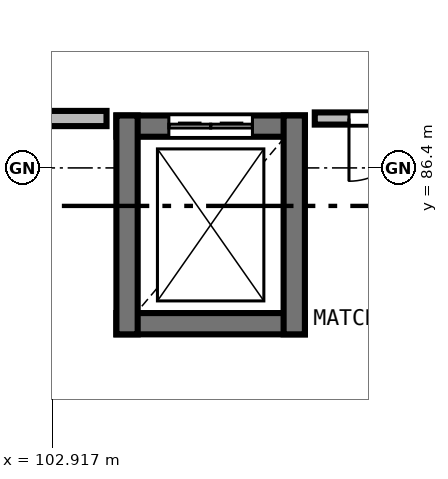
"""IFC4 building model, lengths in metres.
Left out: names, types, materials, properties, quantities, classifications, styles, units other than length and angle.
Written with IfcOpenShell. Run it as: python <this file> out.ifc"""

import sys

from ifc_helpers import new_model, si_unit, direction, frame, frame_2d, origin, place, context, subcontext, project, spatial, rectangle, extrude, element, fill, save


model = new_model("IFC4")
c1 = context("Model", 3, precision=1e-05, world=origin(), true_north=direction((0.0, 1.0)))
c2 = subcontext(c1, "Body", "Model", "MODEL_VIEW")
j1 = project(units=[si_unit("LENGTHUNIT", "METRE"), si_unit("PLANEANGLEUNIT", "RADIAN")], contexts=[c1])
p1 = place(None, origin())
s1 = spatial("IfcSite", under=j1, at=p1, CompositionType="ELEMENT")
p2 = place(p1, origin())
s2 = spatial("IfcBuilding", under=s1, at=p2, CompositionType="ELEMENT")
p3 = place(p2, frame((0.0, 0.0, 13.5)))
s3 = spatial("IfcBuildingStorey", under=s2, at=p3, CompositionType="ELEMENT", Elevation=13.5)
p4 = place(p3, frame((106.24, 84.35, 0.0), z_axis=(0.0, 0.0, 1.0), x_axis=(-1.0, 0.0, 0.0)))
e1 = element("IfcWall", 1, at=p4, inside=s3, PredefinedType="SHEAR", context=c2, shape_type="SweptSolid", body=[
    extrude(rectangle(XDim=2.48, YDim=0.28, at=frame_2d((1.24, 0.0))), origin(), (0.0, 0.0, 1.0), 3.94),
])
p5 = place(p3, frame((103.76, 86.95, 0.0), z_axis=(0.0, 0.0, 1.0), x_axis=(1.0, 0.0, 0.0)))
e2 = element("IfcWall", 2, at=p5, inside=s3, PredefinedType="SHEAR", context=c2, shape_type="SweptSolid", body=[
    extrude(rectangle(XDim=2.48, YDim=0.28, at=frame_2d((1.24, 0.0))), origin(), (0.0, 0.0, 1.0), 3.94),
])
p6 = place(p5, frame((0.69, 0.0, 0.0)))
e3 = element("IfcOpeningElement", 3, at=p6, cuts=e2, PredefinedType="OPENING", context=c2, shape_type="SweptSolid", body=[
    extrude(rectangle(XDim=1.1, YDim=2.15, at=frame_2d((0.55, 1.075))), frame((0.0, 0.15, 0.0), z_axis=(0.0, -1.0, 0.0), x_axis=(1.0, 0.0, 0.0)), (0.0, 0.0, 1.0), 0.3),
])
for number, where, z_axis, x_axis in (
    (4, (103.9, 84.21, 0.0), (0.0, 0.0, 1.0), (0.0, 1.0, 0.0)),
    (5, (106.1, 87.09, 0.0), (0.0, 0.0, 1.0), (0.0, -1.0, 0.0)),
):
    element("IfcWall", number, at=place(p3, frame(where, z_axis=z_axis, x_axis=x_axis)), inside=s3, PredefinedType="SHEAR", context=c2, shape_type="SweptSolid", body=[
        extrude(rectangle(XDim=2.88, YDim=0.28, at=frame_2d((1.44, 0.0))), origin(), (0.0, 0.0, 1.0), 3.94),
    ])
p7 = place(p3, frame((134.18, 87.05, 0.0), z_axis=(0.0, 0.0, 1.0), x_axis=(-1.0, 0.0, 0.0)))
e6 = element("IfcWall", 6, at=p7, inside=s3, PredefinedType="PARTITIONING", context=c2, shape_type="SweptSolid", body=[
    extrude(rectangle(XDim=27.81, YDim=0.16, at=frame_2d((13.905, 0.0))), origin(), (0.0, 0.0, 1.0), 3.355),
])
p8 = place(p7, frame((25.71, 0.0, 0.0)))
e7 = element("IfcOpeningElement", 7, at=p8, cuts=e6, PredefinedType="OPENING", context=c2, shape_type="SweptSolid", body=[
    extrude(rectangle(XDim=1.65, YDim=2.2, at=frame_2d((0.825, 1.1))), frame((0.0, 0.09, 0.0), z_axis=(0.0, -1.0, 0.0), x_axis=(1.0, 0.0, 0.0)), (0.0, 0.0, 1.0), 0.18),
])
p9 = place(p3, frame((103.63, 87.05, 0.0), z_axis=(0.0, 0.0, 1.0), x_axis=(-1.0, 0.0, 0.0)))
e8 = element("IfcWall", 8, at=p9, inside=s3, PredefinedType="SOLIDWALL", context=c2, shape_type="SweptSolid", body=[
    extrude(rectangle(XDim=2.83, YDim=0.2, at=frame_2d((1.415, 0.0))), origin(), (0.0, 0.0, 1.0), 3.355),
])
p10 = place(p6, origin())
e9 = element("IfcDoor", 9, at=p10, inside=s3, OperationType="DOUBLE_DOOR_SLIDING", PredefinedType="DOOR", context=c2, shape_type="SweptSolid", body=[
    extrude(rectangle(XDim=1.1, YDim=2.15, at=frame_2d((0.55, 1.075))), frame((0.0, 0.025, 0.0), z_axis=(0.0, -1.0, 0.0), x_axis=(1.0, 0.0, 0.0)), (0.0, 0.0, 1.0), 0.05),
])
fill(e3, e9)
p11 = place(p8, origin())
e10 = element("IfcDoor", 10, at=p11, inside=s3, OperationType="DOUBLE_DOOR_SINGLE_SWING", PredefinedType="DOOR", context=c2, shape_type="SweptSolid", body=[
    extrude(rectangle(XDim=1.65, YDim=2.2, at=frame_2d((0.825, 1.1))), frame((0.0, 0.025, 0.0), z_axis=(0.0, -1.0, 0.0), x_axis=(1.0, 0.0, 0.0)), (0.0, 0.0, 1.0), 0.05),
])
fill(e7, e10)
save(model, sys.argv[1])
